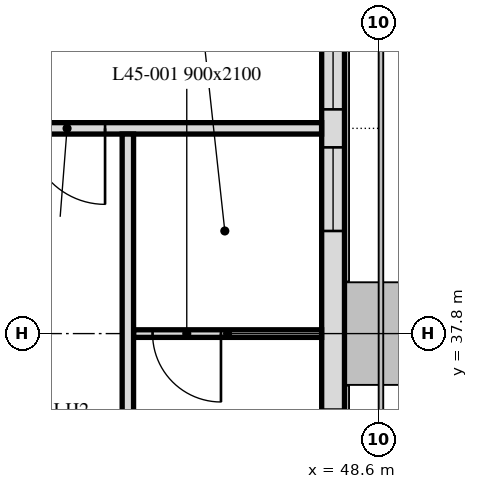
"""IFC4 building model, lengths in metres.
Left out: names, types, materials, properties, quantities, classifications, styles, units other than length and angle.
Written with IfcOpenShell. Run it as: python <this file> out.ifc"""

import sys

from ifc_helpers import new_model, si_unit, direction, frame, frame_2d, origin, place, context, subcontext, project, spatial, rectangle, extrude, element, fill, save


model = new_model("IFC4")
c1 = context("Model", 3, precision=1e-05, world=origin(), true_north=direction((0.0, 1.0)))
c2 = subcontext(c1, "Body", "Model", "MODEL_VIEW")
j1 = project(units=[si_unit("LENGTHUNIT", "METRE"), si_unit("PLANEANGLEUNIT", "RADIAN")], contexts=[c1])
p1 = place(None, origin())
s1 = spatial("IfcSite", under=j1, at=p1, CompositionType="ELEMENT")
p2 = place(p1, origin())
s2 = spatial("IfcBuilding", under=s1, at=p2, CompositionType="ELEMENT")
p3 = place(p2, frame((0.0, 0.0, 187.3)))
s3 = spatial("IfcBuildingStorey", under=s2, at=p3, CompositionType="ELEMENT", Elevation=187.3)
p4 = place(p3, frame((48.0, 10.986, 0.0), z_axis=(0.0, 0.0, 1.0), x_axis=(0.0, 1.0, 0.0)))
e1 = element("IfcWall", 1, at=p4, inside=s3, PredefinedType="SOLIDWALL", context=c2, shape_type="SweptSolid", body=[
    extrude(rectangle(XDim=32.027, YDim=0.3, at=frame_2d((16.014, 0.0))), origin(), (0.0, 0.0, 1.0), 3.0),
])
p5 = place(p4, frame((1.164, 0.0, 0.9)))
e2 = element("IfcOpeningElement", 2, at=p5, cuts=e1, PredefinedType="OPENING", context=c2, shape_type="SweptSolid", body=[
    extrude(rectangle(XDim=1.1, YDim=1.7, at=frame_2d((0.55, 0.85))), frame((0.0, 0.16, 0.0), z_axis=(0.0, -1.0, 0.0), x_axis=(1.0, 0.0, 0.0)), (0.0, 0.0, 1.0), 0.32),
])
p6 = place(p4, frame((2.764, 0.0, 0.9)))
e3 = element("IfcOpeningElement", 3, at=p6, cuts=e1, PredefinedType="OPENING", context=c2, shape_type="SweptSolid", body=[
    extrude(rectangle(XDim=1.1, YDim=1.7, at=frame_2d((0.55, 0.85))), frame((0.0, 0.16, 0.0), z_axis=(0.0, -1.0, 0.0), x_axis=(1.0, 0.0, 0.0)), (0.0, 0.0, 1.0), 0.32),
])
p7 = place(p4, frame((6.564, 0.0, 0.9)))
e4 = element("IfcOpeningElement", 4, at=p7, cuts=e1, PredefinedType="OPENING", context=c2, shape_type="SweptSolid", body=[
    extrude(rectangle(XDim=1.1, YDim=1.7, at=frame_2d((0.55, 0.85))), frame((0.0, 0.16, 0.0), z_axis=(0.0, -1.0, 0.0), x_axis=(1.0, 0.0, 0.0)), (0.0, 0.0, 1.0), 0.32),
])
p8 = place(p4, frame((8.164, 0.0, 0.9)))
e5 = element("IfcOpeningElement", 5, at=p8, cuts=e1, PredefinedType="OPENING", context=c2, shape_type="SweptSolid", body=[
    extrude(rectangle(XDim=1.1, YDim=1.7, at=frame_2d((0.55, 0.85))), frame((0.0, 0.16, 0.0), z_axis=(0.0, -1.0, 0.0), x_axis=(1.0, 0.0, 0.0)), (0.0, 0.0, 1.0), 0.32),
])
p9 = place(p4, frame((11.964, 0.0, 0.9)))
e6 = element("IfcOpeningElement", 6, at=p9, cuts=e1, PredefinedType="OPENING", context=c2, shape_type="SweptSolid", body=[
    extrude(rectangle(XDim=1.1, YDim=1.7, at=frame_2d((0.55, 0.85))), frame((0.0, 0.16, 0.0), z_axis=(0.0, -1.0, 0.0), x_axis=(1.0, 0.0, 0.0)), (0.0, 0.0, 1.0), 0.32),
])
p10 = place(p4, frame((13.564, 0.0, 0.9)))
e7 = element("IfcOpeningElement", 7, at=p10, cuts=e1, PredefinedType="OPENING", context=c2, shape_type="SweptSolid", body=[
    extrude(rectangle(XDim=1.1, YDim=1.7, at=frame_2d((0.55, 0.85))), frame((0.0, 0.16, 0.0), z_axis=(0.0, -1.0, 0.0), x_axis=(1.0, 0.0, 0.0)), (0.0, 0.0, 1.0), 0.32),
])
p11 = place(p4, frame((17.364, 0.0, 0.9)))
e8 = element("IfcOpeningElement", 8, at=p11, cuts=e1, PredefinedType="OPENING", context=c2, shape_type="SweptSolid", body=[
    extrude(rectangle(XDim=1.1, YDim=1.7, at=frame_2d((0.55, 0.85))), frame((0.0, 0.16, 0.0), z_axis=(0.0, -1.0, 0.0), x_axis=(1.0, 0.0, 0.0)), (0.0, 0.0, 1.0), 0.32),
])
p12 = place(p4, frame((18.964, 0.0, 0.9)))
e9 = element("IfcOpeningElement", 9, at=p12, cuts=e1, PredefinedType="OPENING", context=c2, shape_type="SweptSolid", body=[
    extrude(rectangle(XDim=1.1, YDim=1.7, at=frame_2d((0.55, 0.85))), frame((0.0, 0.16, 0.0), z_axis=(0.0, -1.0, 0.0), x_axis=(1.0, 0.0, 0.0)), (0.0, 0.0, 1.0), 0.32),
])
p13 = place(p4, frame((22.414, 0.0, 0.9)))
e10 = element("IfcOpeningElement", 10, at=p13, cuts=e1, PredefinedType="OPENING", context=c2, shape_type="SweptSolid", body=[
    extrude(rectangle(XDim=3.4, YDim=1.7, at=frame_2d((1.7, 0.85))), frame((0.0, 0.16, 0.0), z_axis=(0.0, -1.0, 0.0), x_axis=(1.0, 0.0, 0.0)), (0.0, 0.0, 1.0), 0.32),
])
p14 = place(p4, frame((28.164, 0.0, 0.9)))
e11 = element("IfcOpeningElement", 11, at=p14, cuts=e1, PredefinedType="OPENING", context=c2, shape_type="SweptSolid", body=[
    extrude(rectangle(XDim=1.1, YDim=1.7, at=frame_2d((0.55, 0.85))), frame((0.0, 0.16, 0.0), z_axis=(0.0, -1.0, 0.0), x_axis=(1.0, 0.0, 0.0)), (0.0, 0.0, 1.0), 0.32),
])
p15 = place(p4, frame((29.764, 0.0, 0.9)))
e12 = element("IfcOpeningElement", 12, at=p15, cuts=e1, PredefinedType="OPENING", context=c2, shape_type="SweptSolid", body=[
    extrude(rectangle(XDim=1.1, YDim=1.7, at=frame_2d((0.55, 0.85))), frame((0.0, 0.16, 0.0), z_axis=(0.0, -1.0, 0.0), x_axis=(1.0, 0.0, 0.0)), (0.0, 0.0, 1.0), 0.32),
])
p16 = place(p3, frame((47.849, 37.8, 0.0), z_axis=(0.0, 0.0, 1.0), x_axis=(-1.0, 0.0, 0.0)))
e13 = element("IfcWall", 13, at=p16, inside=s3, PredefinedType="PARTITIONING", context=c2, shape_type="SweptSolid", body=[
    extrude(rectangle(XDim=2.474, YDim=0.1, at=frame_2d((1.237, 0.0))), origin(), (0.0, 0.0, 1.0), 2.4),
])
p17 = place(p16, frame((1.324, 0.0, 0.0)))
e14 = element("IfcOpeningElement", 14, at=p17, cuts=e13, PredefinedType="OPENING", context=c2, shape_type="SweptSolid", body=[
    extrude(rectangle(XDim=0.9, YDim=2.1, at=frame_2d((0.45, 1.05))), frame((0.0, 0.05, 0.0), z_axis=(0.0, -1.0, 0.0), x_axis=(1.0, 0.0, 0.0)), (0.0, 0.0, 1.0), 0.1),
])
p18 = place(p3, frame((47.849, 40.5, 0.0), z_axis=(0.0, 0.0, 1.0), x_axis=(-1.0, 0.0, 0.0)))
e15 = element("IfcWall", 15, at=p18, inside=s3, PredefinedType="PARTITIONING", context=c2, shape_type="SweptSolid", body=[
    extrude(rectangle(XDim=41.698, YDim=0.15, at=frame_2d((20.849, 0.0))), origin(), (0.0, 0.0, 1.0), 2.4),
])
p19 = place(p18, frame((37.899, 0.0, 0.0)))
e16 = element("IfcOpeningElement", 16, at=p19, cuts=e15, PredefinedType="OPENING", context=c2, shape_type="SweptSolid", body=[
    extrude(rectangle(XDim=1.0, YDim=2.1, at=frame_2d((0.5, 1.05))), frame((0.0, 0.075, 0.0), z_axis=(0.0, -1.0, 0.0), x_axis=(1.0, 0.0, 0.0)), (0.0, 0.0, 1.0), 0.15),
])
p20 = place(p18, frame((32.499, 0.0, 0.0)))
e17 = element("IfcOpeningElement", 17, at=p20, cuts=e15, PredefinedType="OPENING", context=c2, shape_type="SweptSolid", body=[
    extrude(rectangle(XDim=1.0, YDim=2.1, at=frame_2d((0.5, 1.05))), frame((0.0, 0.075, 0.0), z_axis=(0.0, -1.0, 0.0), x_axis=(1.0, 0.0, 0.0)), (0.0, 0.0, 1.0), 0.15),
])
p21 = place(p18, frame((27.099, 0.0, 0.0)))
e18 = element("IfcOpeningElement", 18, at=p21, cuts=e15, PredefinedType="OPENING", context=c2, shape_type="SweptSolid", body=[
    extrude(rectangle(XDim=1.0, YDim=2.1, at=frame_2d((0.5, 1.05))), frame((0.0, 0.075, 0.0), z_axis=(0.0, -1.0, 0.0), x_axis=(1.0, 0.0, 0.0)), (0.0, 0.0, 1.0), 0.15),
])
p22 = place(p18, frame((21.699, 0.0, 0.0)))
e19 = element("IfcOpeningElement", 19, at=p22, cuts=e15, PredefinedType="OPENING", context=c2, shape_type="SweptSolid", body=[
    extrude(rectangle(XDim=1.0, YDim=2.1, at=frame_2d((0.5, 1.05))), frame((0.0, 0.075, 0.0), z_axis=(0.0, -1.0, 0.0), x_axis=(1.0, 0.0, 0.0)), (0.0, 0.0, 1.0), 0.15),
])
p23 = place(p18, frame((16.299, 0.0, 0.0)))
e20 = element("IfcOpeningElement", 20, at=p23, cuts=e15, PredefinedType="OPENING", context=c2, shape_type="SweptSolid", body=[
    extrude(rectangle(XDim=1.0, YDim=2.1, at=frame_2d((0.5, 1.05))), frame((0.0, 0.075, 0.0), z_axis=(0.0, -1.0, 0.0), x_axis=(1.0, 0.0, 0.0)), (0.0, 0.0, 1.0), 0.15),
])
p24 = place(p18, frame((10.899, 0.0, 0.0)))
e21 = element("IfcOpeningElement", 21, at=p24, cuts=e15, PredefinedType="OPENING", context=c2, shape_type="SweptSolid", body=[
    extrude(rectangle(XDim=1.0, YDim=2.1, at=frame_2d((0.5, 1.05))), frame((0.0, 0.075, 0.0), z_axis=(0.0, -1.0, 0.0), x_axis=(1.0, 0.0, 0.0)), (0.0, 0.0, 1.0), 0.15),
])
p25 = place(p18, frame((2.849, 0.0, 0.0)))
e22 = element("IfcOpeningElement", 22, at=p25, cuts=e15, PredefinedType="OPENING", context=c2, shape_type="SweptSolid", body=[
    extrude(rectangle(XDim=1.0, YDim=2.1, at=frame_2d((0.5, 1.05))), frame((0.0, 0.075, 0.0), z_axis=(0.0, -1.0, 0.0), x_axis=(1.0, 0.0, 0.0)), (0.0, 0.0, 1.0), 0.15),
])
p26 = place(p3, frame((45.3, 40.425, 0.0), z_axis=(0.0, 0.0, 1.0), x_axis=(0.0, -1.0, 0.0)))
e23 = element("IfcWall", 23, at=p26, inside=s3, PredefinedType="PARTITIONING", context=c2, shape_type="SweptSolid", body=[
    extrude(rectangle(XDim=28.65, YDim=0.15, at=frame_2d((14.325, 0.0))), origin(), (0.0, 0.0, 1.0), 2.4),
])
p27 = place(p26, frame((10.225, 0.0, 0.0)))
e24 = element("IfcOpeningElement", 24, at=p27, cuts=e23, PredefinedType="OPENING", context=c2, shape_type="SweptSolid", body=[
    extrude(rectangle(XDim=1.0, YDim=2.1, at=frame_2d((0.5, 1.05))), frame((0.0, 0.075, 0.0), z_axis=(0.0, -1.0, 0.0), x_axis=(1.0, 0.0, 0.0)), (0.0, 0.0, 1.0), 0.15),
])
p28 = place(p26, frame((25.975, 0.0, 0.0)))
e25 = element("IfcOpeningElement", 25, at=p28, cuts=e23, PredefinedType="OPENING", context=c2, shape_type="SweptSolid", body=[
    extrude(rectangle(XDim=1.0, YDim=2.1, at=frame_2d((0.5, 1.05))), frame((0.0, 0.075, 0.0), z_axis=(0.0, -1.0, 0.0), x_axis=(1.0, 0.0, 0.0)), (0.0, 0.0, 1.0), 0.15),
])
p29 = place(p26, frame((4.825, 0.0, 0.0)))
e26 = element("IfcOpeningElement", 26, at=p29, cuts=e23, PredefinedType="OPENING", context=c2, shape_type="SweptSolid", body=[
    extrude(rectangle(XDim=1.0, YDim=2.1, at=frame_2d((0.5, 1.05))), frame((0.0, 0.075, 0.0), z_axis=(0.0, -1.0, 0.0), x_axis=(1.0, 0.0, 0.0)), (0.0, 0.0, 1.0), 0.15),
])
p30 = place(p26, frame((19.675, 0.0, 0.0)))
e27 = element("IfcOpeningElement", 27, at=p30, cuts=e23, PredefinedType="OPENING", context=c2, shape_type="SweptSolid", body=[
    extrude(rectangle(XDim=1.0, YDim=2.1, at=frame_2d((0.5, 1.05))), frame((0.0, 0.075, 0.0), z_axis=(0.0, -1.0, 0.0), x_axis=(1.0, 0.0, 0.0)), (0.0, 0.0, 1.0), 0.15),
])
p31 = place(p14, origin())
e28 = element("IfcWindow", 28, at=p31, inside=s3, PartitioningType="SINGLE_PANEL", PredefinedType="WINDOW", context=c2, shape_type="SweptSolid", body=[
    extrude(rectangle(XDim=1.1, YDim=1.7, at=frame_2d((0.55, 0.85))), frame((0.0, 0.03, 0.0), z_axis=(0.0, -1.0, 0.0), x_axis=(1.0, 0.0, 0.0)), (0.0, 0.0, 1.0), 0.06),
])
fill(e11, e28)
p32 = place(p15, origin())
e29 = element("IfcWindow", 29, at=p32, inside=s3, PartitioningType="SINGLE_PANEL", PredefinedType="WINDOW", context=c2, shape_type="SweptSolid", body=[
    extrude(rectangle(XDim=1.1, YDim=1.7, at=frame_2d((0.55, 0.85))), frame((0.0, 0.03, 0.0), z_axis=(0.0, -1.0, 0.0), x_axis=(1.0, 0.0, 0.0)), (0.0, 0.0, 1.0), 0.06),
])
fill(e12, e29)
p33 = place(p17, origin())
e30 = element("IfcDoor", 30, at=p33, inside=s3, OperationType="SINGLE_SWING_RIGHT", PredefinedType="DOOR", context=c2, shape_type="SweptSolid", body=[
    extrude(rectangle(XDim=0.9, YDim=2.1, at=frame_2d((0.45, 1.05))), frame((0.0, 0.025, 0.0), z_axis=(0.0, -1.0, 0.0), x_axis=(1.0, 0.0, 0.0)), (0.0, 0.0, 1.0), 0.05),
])
fill(e14, e30)
p34 = place(p25, origin())
e31 = element("IfcDoor", 31, at=p34, inside=s3, OperationType="SINGLE_SWING_RIGHT", PredefinedType="DOOR", context=c2, shape_type="SweptSolid", body=[
    extrude(rectangle(XDim=1.0, YDim=2.1, at=frame_2d((0.5, 1.05))), frame((0.0, 0.025, 0.0), z_axis=(0.0, -1.0, 0.0), x_axis=(1.0, 0.0, 0.0)), (0.0, 0.0, 1.0), 0.05),
])
fill(e22, e31)
save(model, sys.argv[1])
